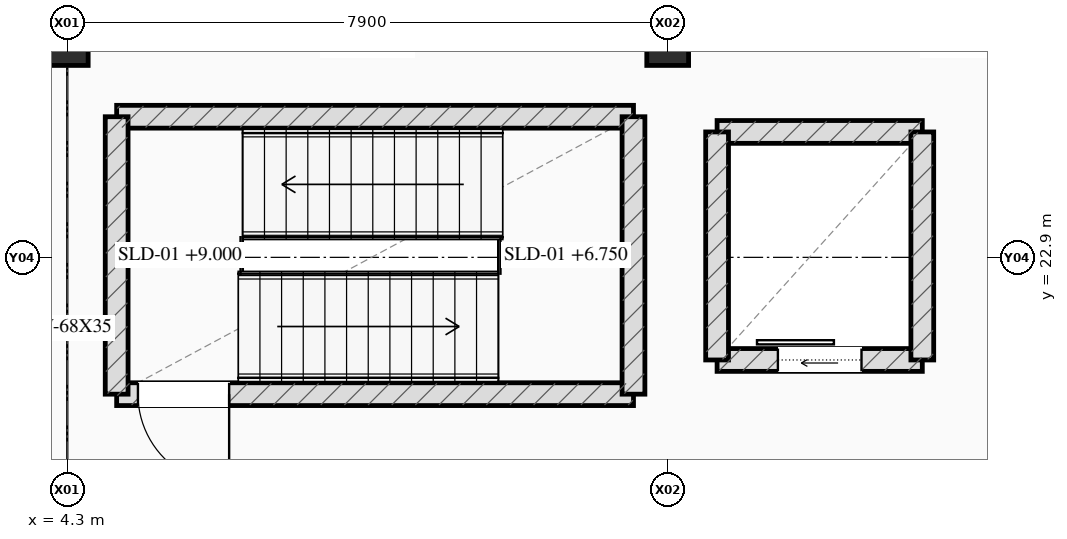
"""IFC4 building model, lengths in metres.
Left out: names, types, materials, properties, quantities, classifications, styles, units other than length and angle.
Written with IfcOpenShell. Run it as: python <this file> out.ifc"""

import sys

from ifc_helpers import new_model, si_unit, direction, frame, frame_2d, origin, origin_2d, place, context, subcontext, project, spatial, rectangle, extrude, element, fill, save


model = new_model("IFC4")
c1 = context("Model", 3, precision=1e-05, world=origin(), true_north=direction((0.0, 1.0)))
c2 = subcontext(c1, "Body", "Model", "MODEL_VIEW")
j1 = project(units=[si_unit("LENGTHUNIT", "METRE"), si_unit("PLANEANGLEUNIT", "RADIAN")], contexts=[c1])
p1 = place(None, origin())
s1 = spatial("IfcSite", under=j1, at=p1, CompositionType="ELEMENT")
p2 = place(p1, origin())
s2 = spatial("IfcBuilding", under=s1, at=p2, CompositionType="ELEMENT")
p3 = place(p2, frame((0.0, 0.0, 4.5)))
s3 = spatial("IfcBuildingStorey", under=s2, at=p3, CompositionType="ELEMENT", Elevation=4.5)
for number, where, z_axis, x_axis in (
    (1, (4.3, 25.7, 0.0), (0.0, 0.0, 1.0), (1.0, 0.0, 0.0)),
    (2, (12.2, 25.7, 0.0), (0.0, 0.0, 1.0), (1.0, 0.0, 0.0)),
):
    element("IfcColumn", number, at=place(p3, frame(where, z_axis=z_axis, x_axis=x_axis)), inside=s3, PredefinedType="COLUMN", context=c2, shape_type="SweptSolid", body=[
        extrude(rectangle(XDim=0.55, YDim=0.55, at=origin_2d()), origin(), (0.0, 0.0, 1.0), 4.5),
    ])
p4 = place(p3, frame((4.95, 21.1, 0.0), z_axis=(0.0, 0.0, 1.0), x_axis=(1.0, 0.0, 0.0)))
e3 = element("IfcWall", 3, at=p4, inside=s3, PredefinedType="SHEAR", context=c2, shape_type="SweptSolid", body=[
    extrude(rectangle(XDim=6.8, YDim=0.3, at=frame_2d((3.4, 0.0))), origin(), (0.0, 0.0, 1.0), 4.25),
])
p5 = place(p4, frame((0.28, 0.0, 0.0)))
e4 = element("IfcOpeningElement", 4, at=p5, cuts=e3, PredefinedType="OPENING", context=c2, shape_type="SweptSolid", body=[
    extrude(rectangle(XDim=1.2, YDim=2.2, at=frame_2d((0.6, 1.1))), frame((0.0, 0.16, 0.0), z_axis=(0.0, -1.0, 0.0), x_axis=(1.0, 0.0, 0.0)), (0.0, 0.0, 1.0), 0.32),
])
p6 = place(p3, frame((11.75, 24.75, 0.0), z_axis=(0.0, 0.0, 1.0), x_axis=(-1.0, 0.0, 0.0)))
e5 = element("IfcWall", 5, at=p6, inside=s3, PredefinedType="SHEAR", context=c2, shape_type="SweptSolid", body=[
    extrude(rectangle(XDim=6.8, YDim=0.3, at=frame_2d((3.4, 0.0))), origin(), (0.0, 0.0, 1.0), 4.25),
])
for number, where, z_axis, x_axis in (
    (6, (4.95, 24.75, 0.0), (0.0, 0.0, 1.0), (0.0, -1.0, 0.0)),
    (7, (11.75, 21.1, 0.0), (0.0, 0.0, 1.0), (0.0, 1.0, 0.0)),
):
    element("IfcWall", number, at=place(p3, frame(where, z_axis=z_axis, x_axis=x_axis)), inside=s3, PredefinedType="SHEAR", context=c2, shape_type="SweptSolid", body=[
        extrude(rectangle(XDim=3.65, YDim=0.3, at=frame_2d((1.825, 0.0))), origin(), (0.0, 0.0, 1.0), 4.25),
    ])
p7 = place(p3, frame((12.85, 21.55, 0.0), z_axis=(0.0, 0.0, 1.0), x_axis=(1.0, 0.0, 0.0)))
e8 = element("IfcWall", 8, at=p7, inside=s3, PredefinedType="SHEAR", context=c2, shape_type="SweptSolid", body=[
    extrude(rectangle(XDim=2.7, YDim=0.3, at=frame_2d((1.35, 0.0))), origin(), (0.0, 0.0, 1.0), 4.25),
])
p8 = place(p7, frame((0.8, 0.0, 0.0)))
e9 = element("IfcOpeningElement", 9, at=p8, cuts=e8, PredefinedType="OPENING", context=c2, shape_type="SweptSolid", body=[
    extrude(rectangle(XDim=1.1, YDim=2.2, at=frame_2d((0.55, 1.1))), frame((0.0, 0.16, 0.0), z_axis=(0.0, -1.0, 0.0), x_axis=(1.0, 0.0, 0.0)), (0.0, 0.0, 1.0), 0.32),
])
p9 = place(p3, frame((12.85, 24.55, 0.0), z_axis=(0.0, 0.0, 1.0), x_axis=(1.0, 0.0, 0.0)))
e10 = element("IfcWall", 10, at=p9, inside=s3, PredefinedType="SHEAR", context=c2, shape_type="SweptSolid", body=[
    extrude(rectangle(XDim=2.7, YDim=0.3, at=frame_2d((1.35, 0.0))), origin(), (0.0, 0.0, 1.0), 4.25),
])
for number, where, z_axis, x_axis in (
    (11, (12.85, 21.55, 0.0), (0.0, 0.0, 1.0), (0.0, 1.0, 0.0)),
    (12, (15.55, 21.55, 0.0), (0.0, 0.0, 1.0), (0.0, 1.0, 0.0)),
):
    element("IfcWall", number, at=place(p3, frame(where, z_axis=z_axis, x_axis=x_axis)), inside=s3, PredefinedType="SHEAR", context=c2, shape_type="SweptSolid", body=[
        extrude(rectangle(XDim=3.0, YDim=0.3, at=frame_2d((1.5, 0.0))), origin(), (0.0, 0.0, 1.0), 4.25),
    ])
p10 = place(p5, origin())
e13 = element("IfcDoor", 13, at=p10, inside=s3, OperationType="SINGLE_SWING_RIGHT", PredefinedType="DOOR", context=c2, shape_type="SweptSolid", body=[
    extrude(rectangle(XDim=1.2, YDim=2.2, at=frame_2d((0.6, 1.1))), frame((0.0, 0.025, 0.0), z_axis=(0.0, -1.0, 0.0), x_axis=(1.0, 0.0, 0.0)), (0.0, 0.0, 1.0), 0.05),
])
fill(e4, e13)
p11 = place(p8, origin())
e14 = element("IfcDoor", 14, at=p11, inside=s3, OperationType="SLIDING_TO_LEFT", PredefinedType="DOOR", context=c2, shape_type="SweptSolid", body=[
    extrude(rectangle(XDim=1.1, YDim=2.2, at=frame_2d((0.55, 1.1))), frame((0.0, 0.025, 0.0), z_axis=(0.0, -1.0, 0.0), x_axis=(1.0, 0.0, 0.0)), (0.0, 0.0, 1.0), 0.05),
])
fill(e9, e14)
save(model, sys.argv[1])
